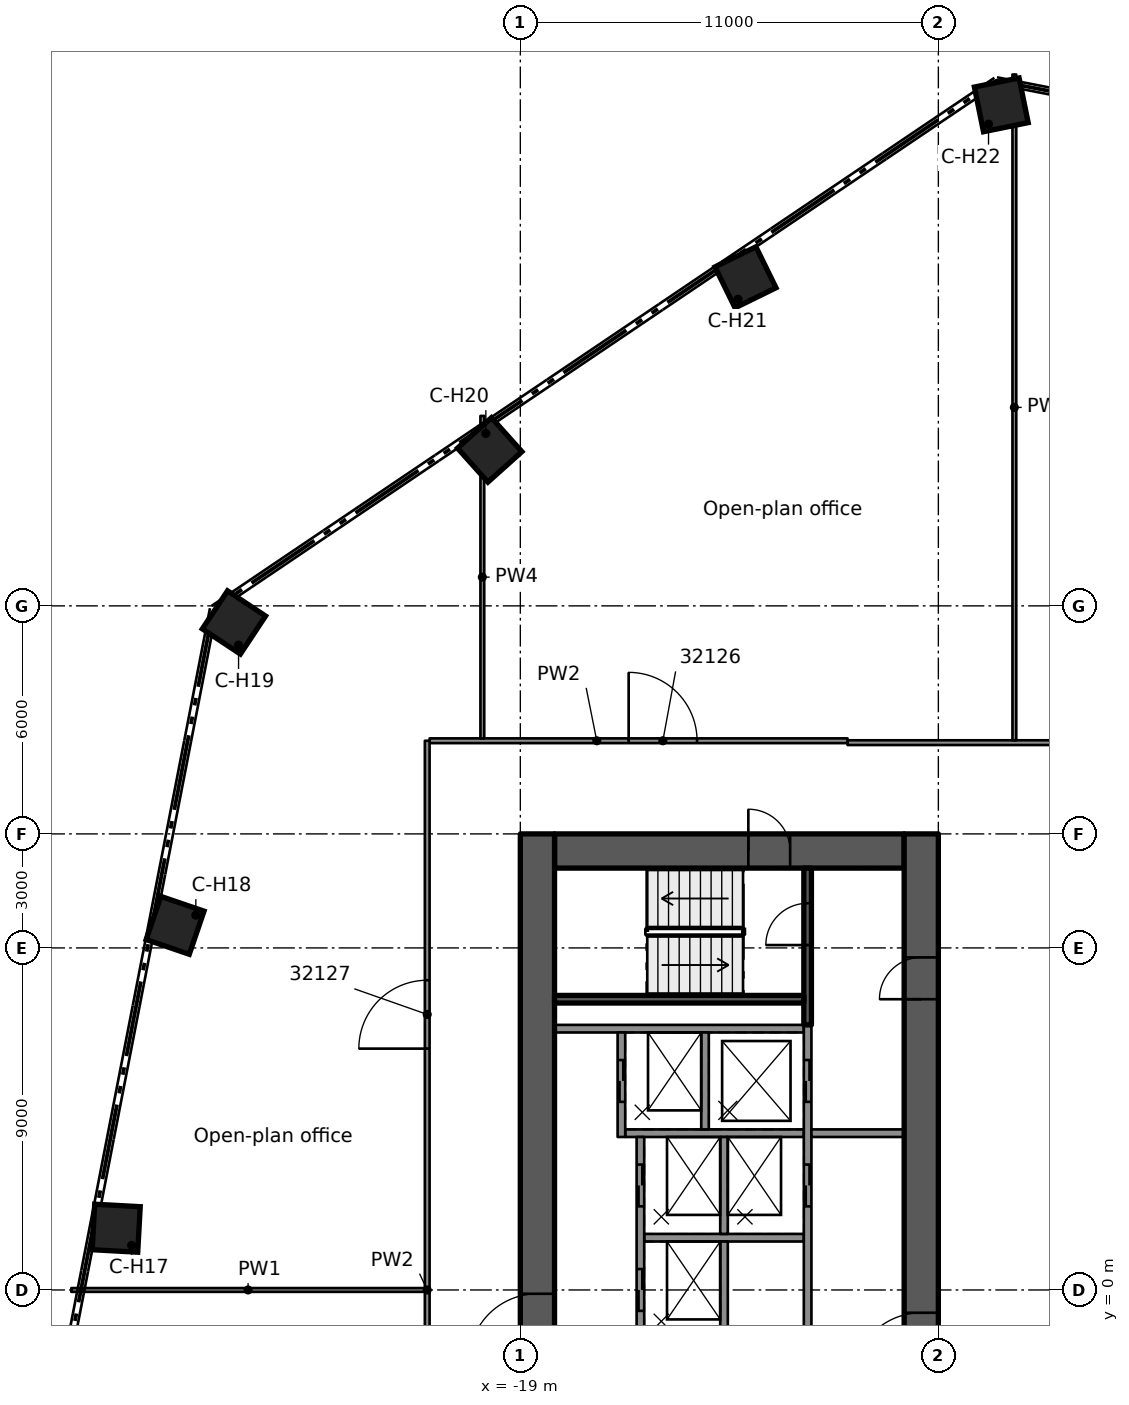
"""IFC4 building model, lengths in metres.
Left out: names, types, materials, properties, quantities, classifications, styles, units other than length and angle.
Written with IfcOpenShell. Run it as: python <this file> out.ifc"""

import sys

from ifc_helpers import new_model, si_unit, direction, frame, frame_2d, origin, origin_2d, place, context, subcontext, project, spatial, rectangle, extrude, element, fill, save


model = new_model("IFC4")
c1 = context("Model", 3, precision=1e-05, world=origin(), true_north=direction((0.0, 1.0)))
c2 = subcontext(c1, "Body", "Model", "MODEL_VIEW")
j1 = project(units=[si_unit("LENGTHUNIT", "METRE"), si_unit("PLANEANGLEUNIT", "RADIAN")], contexts=[c1])
p1 = place(None, origin())
s1 = spatial("IfcSite", under=j1, at=p1, CompositionType="ELEMENT")
p2 = place(p1, origin())
s2 = spatial("IfcBuilding", under=s1, at=p2, CompositionType="ELEMENT")
p3 = place(p2, frame((0.0, 0.0, 159.6)))
s3 = spatial("IfcBuildingStorey", under=s2, at=p3, CompositionType="ELEMENT", Elevation=159.6)
p4 = place(p3, frame((-18.1, 11.55, 0.0), z_axis=(0.0, 0.0, 1.0), x_axis=(1.0, 0.0, 0.0)))
e1 = element("IfcWall", 1, at=p4, inside=s3, PredefinedType="SHEAR", context=c2, shape_type="SweptSolid", body=[
    extrude(rectangle(XDim=9.2, YDim=0.9, at=frame_2d((4.6, 0.0))), origin(), (0.0, 0.0, 1.0), 3.5),
])
p5 = place(p4, frame((5.1, 0.0, 0.0)))
e2 = element("IfcOpeningElement", 2, at=p5, cuts=e1, PredefinedType="OPENING", context=c2, shape_type="SweptSolid", body=[
    extrude(rectangle(XDim=1.1, YDim=2.1, at=frame_2d((0.55, 1.05))), frame((0.0, 0.46, 0.0), z_axis=(0.0, -1.0, 0.0), x_axis=(1.0, 0.0, 0.0)), (0.0, 0.0, 1.0), 0.92),
])
p6 = place(p3, frame((-18.55, -12.0, 0.0), z_axis=(0.0, 0.0, 1.0), x_axis=(0.0, 1.0, 0.0)))
e3 = element("IfcWall", 3, at=p6, inside=s3, PredefinedType="SHEAR", context=c2, shape_type="SweptSolid", body=[
    extrude(rectangle(XDim=24.0, YDim=0.9, at=frame_2d((12.0, 0.0))), origin(), (0.0, 0.0, 1.0), 3.5),
])
p7 = place(p6, frame((10.1, 0.0, 0.0)))
e4 = element("IfcOpeningElement", 4, at=p7, cuts=e3, PredefinedType="OPENING", context=c2, shape_type="SweptSolid", body=[
    extrude(rectangle(XDim=1.8, YDim=2.1, at=frame_2d((0.9, 1.05))), frame((0.0, 0.46, 0.0), z_axis=(0.0, -1.0, 0.0), x_axis=(1.0, 0.0, 0.0)), (0.0, 0.0, 1.0), 0.92),
])
p8 = place(p3, frame((-8.45, -12.0, 0.0), z_axis=(0.0, 0.0, 1.0), x_axis=(0.0, 1.0, 0.0)))
e5 = element("IfcWall", 5, at=p8, inside=s3, PredefinedType="SHEAR", context=c2, shape_type="SweptSolid", body=[
    extrude(rectangle(XDim=24.0, YDim=0.9, at=frame_2d((12.0, 0.0))), origin(), (0.0, 0.0, 1.0), 3.5),
])
p9 = place(p8, frame((9.6, 0.0, 0.0)))
e6 = element("IfcOpeningElement", 6, at=p9, cuts=e5, PredefinedType="OPENING", context=c2, shape_type="SweptSolid", body=[
    extrude(rectangle(XDim=1.8, YDim=2.1, at=frame_2d((0.9, 1.05))), frame((0.0, 0.46, 0.0), z_axis=(0.0, -1.0, 0.0), x_axis=(1.0, 0.0, 0.0)), (0.0, 0.0, 1.0), 0.92),
])
p10 = place(p8, frame((19.65, 0.0, 0.0)))
e7 = element("IfcOpeningElement", 7, at=p10, cuts=e5, PredefinedType="OPENING", context=c2, shape_type="SweptSolid", body=[
    extrude(rectangle(XDim=1.1, YDim=2.1, at=frame_2d((0.55, 1.05))), frame((0.0, 0.46, 0.0), z_axis=(0.0, -1.0, 0.0), x_axis=(1.0, 0.0, 0.0)), (0.0, 0.0, 1.0), 0.92),
])
for number, where, z_axis, x_axis in (
    (8, (-29.634, 1.625, 0.0), (0.0, 0.0, 1.0), (-0.998, 0.055, 0.0)),
    (9, (-28.085, 9.594, 0.0), (0.0, 0.0, 1.0), (-0.946, 0.323, 0.0)),
    (10, (-26.536, 17.564, 0.0), (0.0, 0.0, 1.0), (-0.834, 0.552, 0.0)),
    (11, (-19.806, 22.104, 0.0), (0.0, 0.0, 1.0), (-0.667, 0.745, 0.0)),
    (12, (-13.075, 26.644, 0.0), (0.0, 0.0, 1.0), (-0.441, 0.898, 0.0)),
    (13, (-6.344, 31.183, 0.0), (0.0, 0.0, 1.0), (-0.199, 0.98, 0.0)),
):
    element("IfcColumn", number, at=place(p3, frame(where, z_axis=z_axis, x_axis=x_axis)), inside=s3, PredefinedType="COLUMN", context=c2, shape_type="SweptSolid", body=[
        extrude(rectangle(XDim=1.2, YDim=1.2, at=origin_2d()), origin(), (0.0, 0.0, 1.0), 3.5),
    ])
p11 = place(p3, frame((-11.54, 6.875, 0.0), z_axis=(0.0, 0.0, 1.0), x_axis=(-1.0, 0.0, 0.0)))
e14 = element("IfcWall", 14, at=p11, inside=s3, PredefinedType="SOLIDWALL", context=c2, shape_type="SweptSolid", body=[
    extrude(rectangle(XDim=6.56, YDim=0.2, at=frame_2d((3.28, 0.0))), origin(), (0.0, 0.0, 1.0), 3.09),
])
p12 = place(p3, frame((-11.54, 1.375, 0.0), z_axis=(0.0, 0.0, 1.0), x_axis=(-1.0, 0.0, 0.0)))
e15 = element("IfcWall", 15, at=p12, inside=s3, PredefinedType="SOLIDWALL", context=c2, shape_type="SweptSolid", body=[
    extrude(rectangle(XDim=4.2, YDim=0.2, at=frame_2d((2.1, 0.0))), origin(), (0.0, 0.0, 1.0), 3.09),
])
p13 = place(p3, frame((-11.54, 4.125, 0.0), z_axis=(0.0, 0.0, 1.0), x_axis=(-1.0, 0.0, 0.0)))
e16 = element("IfcWall", 16, at=p13, inside=s3, PredefinedType="SOLIDWALL", context=c2, shape_type="SweptSolid", body=[
    extrude(rectangle(XDim=4.7, YDim=0.2, at=frame_2d((2.35, 0.0))), origin(), (0.0, 0.0, 1.0), 3.09),
])
p14 = place(p3, frame((-11.44, -6.975, 0.0), z_axis=(0.0, 0.0, 1.0), x_axis=(0.0, 1.0, 0.0)))
e17 = element("IfcWall", 17, at=p14, inside=s3, PredefinedType="SOLIDWALL", context=c2, shape_type="SweptSolid", body=[
    extrude(rectangle(XDim=13.95, YDim=0.2, at=frame_2d((6.975, 0.0))), origin(), (0.0, 0.0, 1.0), 3.09),
])
p15 = place(p14, frame((9.175, 0.0, 0.0)))
e18 = element("IfcOpeningElement", 18, at=p15, cuts=e17, PredefinedType="OPENING", context=c2, shape_type="SweptSolid", body=[
    extrude(rectangle(XDim=1.1, YDim=2.1, at=frame_2d((0.55, 1.05))), frame((0.0, 0.11, 0.0), z_axis=(0.0, -1.0, 0.0), x_axis=(1.0, 0.0, 0.0)), (0.0, 0.0, 1.0), 0.22),
])
p16 = place(p14, frame((11.925, 0.0, 0.0)))
e19 = element("IfcOpeningElement", 19, at=p16, cuts=e17, PredefinedType="OPENING", context=c2, shape_type="SweptSolid", body=[
    extrude(rectangle(XDim=1.1, YDim=2.1, at=frame_2d((0.55, 1.05))), frame((0.0, 0.11, 0.0), z_axis=(0.0, -1.0, 0.0), x_axis=(1.0, 0.0, 0.0)), (0.0, 0.0, 1.0), 0.22),
])
p17 = place(p14, frame((1.075, 0.0, 0.0)))
e20 = element("IfcOpeningElement", 20, at=p17, cuts=e17, PredefinedType="OPENING", context=c2, shape_type="SweptSolid", body=[
    extrude(rectangle(XDim=0.8, YDim=2.1, at=frame_2d((0.4, 1.05))), frame((0.0, 0.11, 0.0), z_axis=(0.0, -1.0, 0.0), x_axis=(1.0, 0.0, 0.0)), (0.0, 0.0, 1.0), 0.22),
])
p18 = place(p14, frame((3.825, 0.0, 0.0)))
e21 = element("IfcOpeningElement", 21, at=p18, cuts=e17, PredefinedType="OPENING", context=c2, shape_type="SweptSolid", body=[
    extrude(rectangle(XDim=0.8, YDim=2.1, at=frame_2d((0.4, 1.05))), frame((0.0, 0.11, 0.0), z_axis=(0.0, -1.0, 0.0), x_axis=(1.0, 0.0, 0.0)), (0.0, 0.0, 1.0), 0.22),
])
p19 = place(p3, frame((-13.64, -4.025, 0.0), z_axis=(0.0, 0.0, 1.0), x_axis=(0.0, 1.0, 0.0)))
e22 = element("IfcWall", 22, at=p19, inside=s3, PredefinedType="SOLIDWALL", context=c2, shape_type="SweptSolid", body=[
    extrude(rectangle(XDim=5.3, YDim=0.2, at=frame_2d((2.65, 0.0))), origin(), (0.0, 0.0, 1.0), 3.09),
])
for number, where, z_axis, x_axis in (
    (23, (-13.64, 1.475, 0.0), (0.0, 0.0, 1.0), (0.0, 1.0, 0.0)),
    (24, (-14.14, 4.225, 0.0), (0.0, 0.0, 1.0), (0.0, 1.0, 0.0)),
):
    element("IfcWall", number, at=place(p3, frame(where, z_axis=z_axis, x_axis=x_axis)), inside=s3, PredefinedType="SOLIDWALL", context=c2, shape_type="SweptSolid", body=[
        extrude(rectangle(XDim=2.55, YDim=0.2, at=frame_2d((1.275, 0.0))), origin(), (0.0, 0.0, 1.0), 3.09),
    ])
p20 = place(p3, frame((-15.84, -4.025, 0.0), z_axis=(0.0, 0.0, 1.0), x_axis=(0.0, 1.0, 0.0)))
e25 = element("IfcWall", 25, at=p20, inside=s3, PredefinedType="SOLIDWALL", context=c2, shape_type="SweptSolid", body=[
    extrude(rectangle(XDim=8.05, YDim=0.2, at=frame_2d((4.025, 0.0))), origin(), (0.0, 0.0, 1.0), 3.09),
])
p21 = place(p20, frame((3.475, 0.0, 0.0)))
e26 = element("IfcOpeningElement", 26, at=p21, cuts=e25, PredefinedType="OPENING", context=c2, shape_type="SweptSolid", body=[
    extrude(rectangle(XDim=1.1, YDim=2.1, at=frame_2d((0.55, 1.05))), frame((0.0, 0.11, 0.0), z_axis=(0.0, -1.0, 0.0), x_axis=(1.0, 0.0, 0.0)), (0.0, 0.0, 1.0), 0.22),
])
p22 = place(p20, frame((6.225, 0.0, 0.0)))
e27 = element("IfcOpeningElement", 27, at=p22, cuts=e25, PredefinedType="OPENING", context=c2, shape_type="SweptSolid", body=[
    extrude(rectangle(XDim=1.1, YDim=2.1, at=frame_2d((0.55, 1.05))), frame((0.0, 0.11, 0.0), z_axis=(0.0, -1.0, 0.0), x_axis=(1.0, 0.0, 0.0)), (0.0, 0.0, 1.0), 0.22),
])
p23 = place(p3, frame((-16.34, 4.025, 0.0), z_axis=(0.0, 0.0, 1.0), x_axis=(0.0, 1.0, 0.0)))
e28 = element("IfcWall", 28, at=p23, inside=s3, PredefinedType="SOLIDWALL", context=c2, shape_type="SweptSolid", body=[
    extrude(rectangle(XDim=2.75, YDim=0.2, at=frame_2d((1.375, 0.0))), origin(), (0.0, 0.0, 1.0), 3.09),
])
p24 = place(p23, frame((0.925, 0.0, 0.0)))
e29 = element("IfcOpeningElement", 29, at=p24, cuts=e28, PredefinedType="OPENING", context=c2, shape_type="SweptSolid", body=[
    extrude(rectangle(XDim=1.1, YDim=2.1, at=frame_2d((0.55, 1.05))), frame((0.0, 0.11, 0.0), z_axis=(0.0, -1.0, 0.0), x_axis=(1.0, 0.0, 0.0)), (0.0, 0.0, 1.0), 0.22),
])
p25 = place(p3, frame((-11.44, 6.975, 0.0), z_axis=(0.0, 0.0, 1.0), x_axis=(0.0, 1.0, 0.0)))
e30 = element("IfcWall", 30, at=p25, inside=s3, PredefinedType="SOLIDWALL", context=c2, shape_type="SweptSolid", body=[
    extrude(rectangle(XDim=4.125, YDim=0.2, at=frame_2d((2.062, 0.0))), origin(), (0.0, 0.0, 1.0), 3.09),
])
p26 = place(p25, frame((2.1, 0.0, 0.0)))
e31 = element("IfcOpeningElement", 31, at=p26, cuts=e30, PredefinedType="OPENING", context=c2, shape_type="SweptSolid", body=[
    extrude(rectangle(XDim=1.1, YDim=2.1, at=frame_2d((0.55, 1.05))), frame((0.0, 0.11, 0.0), z_axis=(0.0, -1.0, 0.0), x_axis=(1.0, 0.0, 0.0)), (0.0, 0.0, 1.0), 0.22),
])
p27 = place(p3, frame((-11.54, 7.65, 0.0), z_axis=(0.0, 0.0, 1.0), x_axis=(-1.0, 0.0, 0.0)))
e32 = element("IfcWall", 32, at=p27, inside=s3, PredefinedType="SOLIDWALL", context=c2, shape_type="SweptSolid", body=[
    extrude(rectangle(XDim=6.56, YDim=0.2, at=frame_2d((3.28, 0.0))), origin(), (0.0, 0.0, 1.0), 3.09),
])
p28 = place(p3, frame((-8.9, 4.125, 0.0), z_axis=(0.0, 0.0, 1.0), x_axis=(-1.0, 0.0, 0.0)))
e33 = element("IfcWall", 33, at=p28, inside=s3, PredefinedType="PARTITIONING", context=c2, shape_type="SweptSolid", body=[
    extrude(rectangle(XDim=2.44, YDim=0.2, at=frame_2d((1.22, 0.0))), origin(), (0.0, 0.0, 1.0), 3.09),
])
p29 = place(p3, frame((-30.816, 0.0, 0.0), z_axis=(0.0, 0.0, 1.0), x_axis=(1.0, 0.0, 0.0)))
e34 = element("IfcWall", 34, at=p29, inside=s3, PredefinedType="PARTITIONING", context=c2, shape_type="SweptSolid", body=[
    extrude(rectangle(XDim=9.304, YDim=0.1, at=frame_2d((4.652, 0.0))), origin(), (0.0, 0.0, 1.0), 3.08),
])
p30 = place(p3, frame((-10.39, 14.401, 0.0), z_axis=(0.0, 0.0, 1.0), x_axis=(1.0, 0.0, 0.0)))
e35 = element("IfcWall", 35, at=p30, inside=s3, PredefinedType="PARTITIONING", context=c2, shape_type="SweptSolid", body=[
    extrude(rectangle(XDim=20.781, YDim=0.125, at=frame_2d((10.391, 0.0))), origin(), (0.0, 0.0, 1.0), 3.08),
])
p31 = place(p30, frame((12.74, 0.0, 0.0)))
e36 = element("IfcOpeningElement", 36, at=p31, cuts=e35, PredefinedType="OPENING", context=c2, shape_type="SweptSolid", body=[
    extrude(rectangle(XDim=1.1, YDim=2.1, at=frame_2d((0.55, 1.05))), frame((0.0, 0.073, 0.0), z_axis=(0.0, -1.0, 0.0), x_axis=(1.0, 0.0, 0.0)), (0.0, 0.0, 1.0), 0.145),
])
p32 = place(p30, frame((6.74, 0.0, 0.0)))
e37 = element("IfcOpeningElement", 37, at=p32, cuts=e35, PredefinedType="OPENING", context=c2, shape_type="SweptSolid", body=[
    extrude(rectangle(XDim=1.1, YDim=2.1, at=frame_2d((0.55, 1.05))), frame((0.0, 0.073, 0.0), z_axis=(0.0, -1.0, 0.0), x_axis=(1.0, 0.0, 0.0)), (0.0, 0.0, 1.0), 0.145),
])
p33 = place(p3, frame((-21.387, 14.451, 0.0), z_axis=(0.0, 0.0, 1.0), x_axis=(1.0, 0.0, 0.0)))
e38 = element("IfcWall", 38, at=p33, inside=s3, PredefinedType="PARTITIONING", context=c2, shape_type="SweptSolid", body=[
    extrude(rectangle(XDim=10.996, YDim=0.125, at=frame_2d((5.498, 0.0))), origin(), (0.0, 0.0, 1.0), 3.08),
])
p34 = place(p33, frame((5.238, 0.0, 0.0)))
e39 = element("IfcOpeningElement", 39, at=p34, cuts=e38, PredefinedType="OPENING", context=c2, shape_type="SweptSolid", body=[
    extrude(rectangle(XDim=1.8, YDim=2.1, at=frame_2d((0.9, 1.05))), frame((0.0, 0.073, 0.0), z_axis=(0.0, -1.0, 0.0), x_axis=(1.0, 0.0, 0.0)), (0.0, 0.0, 1.0), 0.145),
])
p35 = place(p3, frame((-6.0, 14.463, 0.0), z_axis=(0.0, 0.0, 1.0), x_axis=(0.0, 1.0, 0.0)))
e40 = element("IfcWall", 40, at=p35, inside=s3, PredefinedType="PARTITIONING", context=c2, shape_type="SweptSolid", body=[
    extrude(rectangle(XDim=17.519, YDim=0.1, at=frame_2d((8.76, 0.0))), origin(), (0.0, 0.0, 1.0), 2.445),
])
p36 = place(p3, frame((-20.0, 14.514, 0.0), z_axis=(0.0, 0.0, 1.0), x_axis=(0.0, 1.0, 0.0)))
e41 = element("IfcWall", 41, at=p36, inside=s3, PredefinedType="PARTITIONING", context=c2, shape_type="SweptSolid", body=[
    extrude(rectangle(XDim=8.484, YDim=0.1, at=frame_2d((4.242, 0.0))), origin(), (0.0, 0.0, 1.0), 2.445),
])
p37 = place(p3, frame((-21.45, -14.451, 0.0), z_axis=(0.0, 0.0, 1.0), x_axis=(0.0, 1.0, 0.0)))
e42 = element("IfcWall", 42, at=p37, inside=s3, PredefinedType="PARTITIONING", context=c2, shape_type="SweptSolid", body=[
    extrude(rectangle(XDim=28.902, YDim=0.125, at=frame_2d((14.451, 0.0))), origin(), (0.0, 0.0, 1.0), 3.08),
])
p38 = place(p37, frame((6.85, 0.0, 0.0)))
e43 = element("IfcOpeningElement", 43, at=p38, cuts=e42, PredefinedType="OPENING", context=c2, shape_type="SweptSolid", body=[
    extrude(rectangle(XDim=0.9, YDim=2.1, at=frame_2d((0.45, 1.05))), frame((0.0, 0.073, 0.0), z_axis=(0.0, -1.0, 0.0), x_axis=(1.0, 0.0, 0.0)), (0.0, 0.0, 1.0), 0.145),
])
p39 = place(p37, frame((20.801, 0.0, 0.0)))
e44 = element("IfcOpeningElement", 44, at=p39, cuts=e42, PredefinedType="OPENING", context=c2, shape_type="SweptSolid", body=[
    extrude(rectangle(XDim=1.8, YDim=2.1, at=frame_2d((0.9, 1.05))), frame((0.0, 0.073, 0.0), z_axis=(0.0, -1.0, 0.0), x_axis=(1.0, 0.0, 0.0)), (0.0, 0.0, 1.0), 0.145),
])
p40 = place(p21, origin())
e45 = element("IfcDoor", 45, at=p40, inside=s3, OperationType="DOUBLE_DOOR_SLIDING", PredefinedType="DOOR", context=c2, shape_type="SweptSolid", body=[
    extrude(rectangle(XDim=1.1, YDim=2.1, at=frame_2d((0.55, 1.05))), frame((0.0, 0.025, 0.0), z_axis=(0.0, -1.0, 0.0), x_axis=(1.0, 0.0, 0.0)), (0.0, 0.0, 1.0), 0.05),
])
fill(e26, e45)
p41 = place(p15, origin())
e46 = element("IfcDoor", 46, at=p41, inside=s3, OperationType="DOUBLE_DOOR_SLIDING", PredefinedType="DOOR", context=c2, shape_type="SweptSolid", body=[
    extrude(rectangle(XDim=1.1, YDim=2.1, at=frame_2d((0.55, 1.05))), frame((0.0, 0.025, 0.0), z_axis=(0.0, -1.0, 0.0), x_axis=(1.0, 0.0, 0.0)), (0.0, 0.0, 1.0), 0.05),
])
fill(e18, e46)
p42 = place(p22, origin())
e47 = element("IfcDoor", 47, at=p42, inside=s3, OperationType="DOUBLE_DOOR_SLIDING", PredefinedType="DOOR", context=c2, shape_type="SweptSolid", body=[
    extrude(rectangle(XDim=1.1, YDim=2.1, at=frame_2d((0.55, 1.05))), frame((0.0, 0.025, 0.0), z_axis=(0.0, -1.0, 0.0), x_axis=(1.0, 0.0, 0.0)), (0.0, 0.0, 1.0), 0.05),
])
fill(e27, e47)
p43 = place(p16, origin())
e48 = element("IfcDoor", 48, at=p43, inside=s3, OperationType="DOUBLE_DOOR_SLIDING", PredefinedType="DOOR", context=c2, shape_type="SweptSolid", body=[
    extrude(rectangle(XDim=1.1, YDim=2.1, at=frame_2d((0.55, 1.05))), frame((0.0, 0.025, 0.0), z_axis=(0.0, -1.0, 0.0), x_axis=(1.0, 0.0, 0.0)), (0.0, 0.0, 1.0), 0.05),
])
fill(e19, e48)
p44 = place(p24, origin())
e49 = element("IfcDoor", 49, at=p44, inside=s3, OperationType="DOUBLE_DOOR_SLIDING", PredefinedType="DOOR", context=c2, shape_type="SweptSolid", body=[
    extrude(rectangle(XDim=1.1, YDim=2.1, at=frame_2d((0.55, 1.05))), frame((0.0, 0.025, 0.0), z_axis=(0.0, -1.0, 0.0), x_axis=(1.0, 0.0, 0.0)), (0.0, 0.0, 1.0), 0.05),
])
fill(e29, e49)
p45 = place(p9, origin())
e50 = element("IfcDoor", 50, at=p45, inside=s3, OperationType="SINGLE_SWING_LEFT", PredefinedType="DOOR", context=c2, shape_type="SweptSolid", body=[
    extrude(rectangle(XDim=1.8, YDim=2.1, at=frame_2d((0.9, 1.05))), frame((0.0, 0.025, 0.0), z_axis=(0.0, -1.0, 0.0), x_axis=(1.0, 0.0, 0.0)), (0.0, 0.0, 1.0), 0.05),
])
fill(e6, e50)
p46 = place(p7, origin())
e51 = element("IfcDoor", 51, at=p46, inside=s3, OperationType="SINGLE_SWING_LEFT", PredefinedType="DOOR", context=c2, shape_type="SweptSolid", body=[
    extrude(rectangle(XDim=1.8, YDim=2.1, at=frame_2d((0.9, 1.05))), frame((0.0, 0.025, 0.0), z_axis=(0.0, -1.0, 0.0), x_axis=(1.0, 0.0, 0.0)), (0.0, 0.0, 1.0), 0.05),
])
fill(e4, e51)
p47 = place(p10, origin())
e52 = element("IfcDoor", 52, at=p47, inside=s3, OperationType="SINGLE_SWING_RIGHT", PredefinedType="DOOR", context=c2, shape_type="SweptSolid", body=[
    extrude(rectangle(XDim=1.1, YDim=2.1, at=frame_2d((0.55, 1.05))), frame((0.0, 0.025, 0.0), z_axis=(0.0, -1.0, 0.0), x_axis=(1.0, 0.0, 0.0)), (0.0, 0.0, 1.0), 0.05),
])
fill(e7, e52)
p48 = place(p5, origin())
e53 = element("IfcDoor", 53, at=p48, inside=s3, OperationType="SINGLE_SWING_RIGHT", PredefinedType="DOOR", context=c2, shape_type="SweptSolid", body=[
    extrude(rectangle(XDim=1.1, YDim=2.1, at=frame_2d((0.55, 1.05))), frame((0.0, 0.025, 0.0), z_axis=(0.0, -1.0, 0.0), x_axis=(1.0, 0.0, 0.0)), (0.0, 0.0, 1.0), 0.05),
])
fill(e2, e53)
p49 = place(p26, origin())
e54 = element("IfcDoor", 54, at=p49, inside=s3, OperationType="SINGLE_SWING_RIGHT", PredefinedType="DOOR", context=c2, shape_type="SweptSolid", body=[
    extrude(rectangle(XDim=1.1, YDim=2.1, at=frame_2d((0.55, 1.05))), frame((0.0, 0.025, 0.0), z_axis=(0.0, -1.0, 0.0), x_axis=(1.0, 0.0, 0.0)), (0.0, 0.0, 1.0), 0.05),
])
fill(e31, e54)
p50 = place(p34, origin())
e55 = element("IfcDoor", 55, at=p50, inside=s3, OperationType="DOUBLE_DOOR_SINGLE_SWING", PredefinedType="DOOR", context=c2, shape_type="SweptSolid", body=[
    extrude(rectangle(XDim=1.8, YDim=2.1, at=frame_2d((0.9, 1.05))), frame((0.0, 0.025, 0.0), z_axis=(0.0, -1.0, 0.0), x_axis=(1.0, 0.0, 0.0)), (0.0, 0.0, 1.0), 0.05),
])
fill(e39, e55)
p51 = place(p39, origin())
e56 = element("IfcDoor", 56, at=p51, inside=s3, OperationType="DOUBLE_DOOR_SINGLE_SWING", PredefinedType="DOOR", context=c2, shape_type="SweptSolid", body=[
    extrude(rectangle(XDim=1.8, YDim=2.1, at=frame_2d((0.9, 1.05))), frame((0.0, 0.025, 0.0), z_axis=(0.0, -1.0, 0.0), x_axis=(1.0, 0.0, 0.0)), (0.0, 0.0, 1.0), 0.05),
])
fill(e44, e56)
save(model, sys.argv[1])
